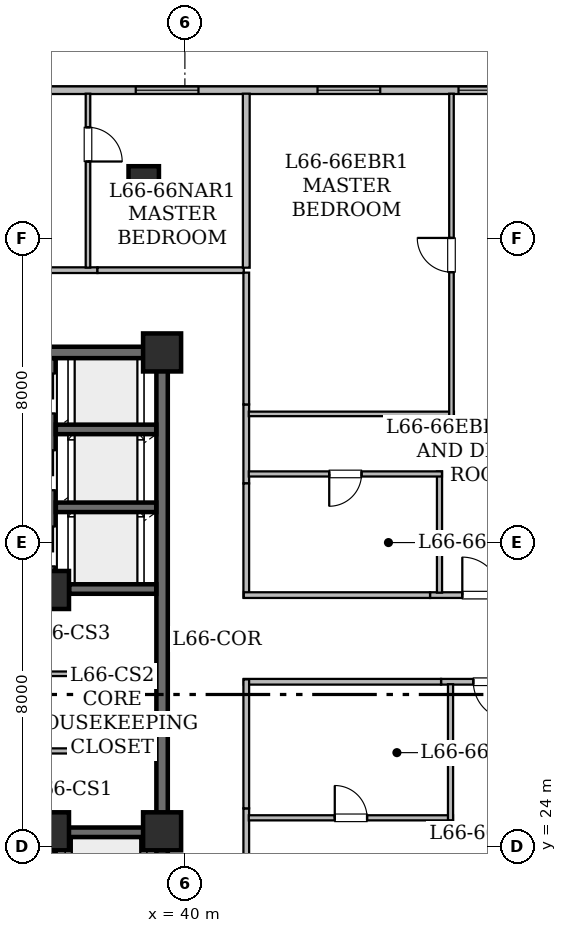
"""IFC4 building model, lengths in metres.
Left out: names, types, materials, properties, quantities, classifications, styles, units other than length and angle.
Written with IfcOpenShell. Run it as: python <this file> out.ifc"""

import sys

from ifc_helpers import new_model, si_unit, direction, frame, frame_2d, origin, origin_2d, place, context, subcontext, project, spatial, rectangle, hollow_rectangle, extrude, element, fill, save


model = new_model("IFC4")
c1 = context("Model", 3, precision=1e-05, world=origin(), true_north=direction((0.0, 1.0)))
c2 = subcontext(c1, "Body", "Model", "MODEL_VIEW")
j1 = project(units=[si_unit("LENGTHUNIT", "METRE"), si_unit("PLANEANGLEUNIT", "RADIAN")], contexts=[c1])
p1 = place(None, origin())
s1 = spatial("IfcSite", under=j1, at=p1, CompositionType="ELEMENT")
p2 = place(p1, origin())
s2 = spatial("IfcBuilding", under=s1, at=p2, CompositionType="ELEMENT")
p3 = place(p2, frame((0.0, 0.0, 257.35)))
s3 = spatial("IfcBuildingStorey", under=s2, at=p3, CompositionType="ELEMENT", Elevation=257.35)
for number, where, z_axis, x_axis in (
    (1, (36.45, 24.4, 0.0), (0.0, 0.0, 1.0), (1.0, 0.0, 0.0)),
    (2, (39.4, 24.4, 0.0), (0.0, 0.0, 1.0), (1.0, 0.0, 0.0)),
    (3, (36.45, 30.75, 0.0), (0.0, 0.0, 1.0), (1.0, 0.0, 0.0)),
    (4, (39.4, 37.0, 0.0), (0.0, 0.0, 1.0), (1.0, 0.0, 0.0)),
):
    element("IfcColumn", number, at=place(p3, frame(where, z_axis=z_axis, x_axis=x_axis)), inside=s3, PredefinedType="COLUMN", context=c2, shape_type="SweptSolid", body=[
        extrude(hollow_rectangle(XDim=1.0, YDim=1.0, WallThickness=0.05, at=origin_2d()), origin(), (0.0, 0.0, 1.0), 3.65),
    ])
p4 = place(p3, frame((38.917, 41.5, 0.0), z_axis=(0.0, 0.0, 1.0), x_axis=(1.0, 0.0, 0.0)))
e5 = element("IfcColumn", 5, at=p4, inside=s3, PredefinedType="COLUMN", context=c2, shape_type="SweptSolid", body=[
    extrude(hollow_rectangle(XDim=0.8, YDim=0.8, WallThickness=0.04, at=origin_2d()), origin(), (0.0, 0.0, 1.0), 3.65),
])
p5 = place(p3, frame((24.302, 43.9, 0.0), z_axis=(0.0, 0.0, 1.0), x_axis=(1.0, 0.0, 0.0)))
e6 = element("IfcWall", 6, at=p5, inside=s3, PredefinedType="STANDARD", context=c2, shape_type="SweptSolid", body=[
    extrude(rectangle(XDim=41.457, YDim=0.2, at=frame_2d((20.729, 0.0))), origin(), (0.0, 0.0, 1.0), 3.43),
])
p6 = place(p5, frame((0.604, 0.0, 0.85)))
e7 = element("IfcOpeningElement", 7, at=p6, cuts=e6, PredefinedType="OPENING", context=c2, shape_type="SweptSolid", body=[
    extrude(rectangle(XDim=1.65, YDim=1.55, at=frame_2d((0.825, 0.775))), frame((0.0, 0.11, 0.0), z_axis=(0.0, -1.0, 0.0), x_axis=(1.0, 0.0, 0.0)), (0.0, 0.0, 1.0), 0.22),
])
p7 = place(p5, frame((9.098, 0.0, 0.85)))
e8 = element("IfcOpeningElement", 8, at=p7, cuts=e6, PredefinedType="OPENING", context=c2, shape_type="SweptSolid", body=[
    extrude(rectangle(XDim=1.65, YDim=1.55, at=frame_2d((0.825, 0.775))), frame((0.0, 0.11, 0.0), z_axis=(0.0, -1.0, 0.0), x_axis=(1.0, 0.0, 0.0)), (0.0, 0.0, 1.0), 0.22),
])
p8 = place(p5, frame((14.405, 0.0, 0.85)))
e9 = element("IfcOpeningElement", 9, at=p8, cuts=e6, PredefinedType="OPENING", context=c2, shape_type="SweptSolid", body=[
    extrude(rectangle(XDim=1.65, YDim=1.55, at=frame_2d((0.825, 0.775))), frame((0.0, 0.11, 0.0), z_axis=(0.0, -1.0, 0.0), x_axis=(1.0, 0.0, 0.0)), (0.0, 0.0, 1.0), 0.22),
])
p9 = place(p5, frame((22.898, 0.0, 0.8)))
e10 = element("IfcOpeningElement", 10, at=p9, cuts=e6, PredefinedType="OPENING", context=c2, shape_type="SweptSolid", body=[
    extrude(rectangle(XDim=1.2, YDim=1.5, at=frame_2d((0.6, 0.75))), frame((0.0, 0.11, 0.0), z_axis=(0.0, -1.0, 0.0), x_axis=(1.0, 0.0, 0.0)), (0.0, 0.0, 1.0), 0.22),
])
p10 = place(p5, frame((19.188, 0.0, 0.85)))
e11 = element("IfcOpeningElement", 11, at=p10, cuts=e6, PredefinedType="OPENING", context=c2, shape_type="SweptSolid", body=[
    extrude(rectangle(XDim=1.65, YDim=1.55, at=frame_2d((0.825, 0.775))), frame((0.0, 0.11, 0.0), z_axis=(0.0, -1.0, 0.0), x_axis=(1.0, 0.0, 0.0)), (0.0, 0.0, 1.0), 0.22),
])
p11 = place(p5, frame((26.158, 0.0, 0.85)))
e12 = element("IfcOpeningElement", 12, at=p11, cuts=e6, PredefinedType="OPENING", context=c2, shape_type="SweptSolid", body=[
    extrude(rectangle(XDim=1.65, YDim=1.55, at=frame_2d((0.825, 0.775))), frame((0.0, 0.11, 0.0), z_axis=(0.0, -1.0, 0.0), x_axis=(1.0, 0.0, 0.0)), (0.0, 0.0, 1.0), 0.22),
])
p12 = place(p5, frame((32.408, 0.0, 0.85)))
e13 = element("IfcOpeningElement", 13, at=p12, cuts=e6, PredefinedType="OPENING", context=c2, shape_type="SweptSolid", body=[
    extrude(rectangle(XDim=1.65, YDim=1.55, at=frame_2d((0.825, 0.775))), frame((0.0, 0.11, 0.0), z_axis=(0.0, -1.0, 0.0), x_axis=(1.0, 0.0, 0.0)), (0.0, 0.0, 1.0), 0.22),
])
p13 = place(p3, frame((29.0, 37.0, 0.0), z_axis=(0.0, 0.0, 1.0), x_axis=(1.0, 0.0, 0.0)))
e14 = element("IfcWall", 14, at=p13, inside=s3, PredefinedType="SHEAR", context=c2, shape_type="SweptSolid", body=[
    extrude(rectangle(XDim=10.4, YDim=0.3, at=frame_2d((5.2, 0.0))), origin(), (0.0, 0.0, 1.0), 3.43),
])
p14 = place(p13, frame((5.14, 0.0, 0.0)))
e15 = element("IfcOpeningElement", 15, at=p14, cuts=e14, PredefinedType="OPENING", context=c2, shape_type="SweptSolid", body=[
    extrude(rectangle(XDim=1.15, YDim=2.2, at=frame_2d((0.575, 1.1))), frame((0.0, 0.16, 0.0), z_axis=(0.0, -1.0, 0.0), x_axis=(1.0, 0.0, 0.0)), (0.0, 0.0, 1.0), 0.32),
])
p15 = place(p3, frame((39.4, 19.0, 0.0), z_axis=(0.0, 0.0, 1.0), x_axis=(0.0, 1.0, 0.0)))
e16 = element("IfcWall", 16, at=p15, inside=s3, PredefinedType="SHEAR", context=c2, shape_type="SweptSolid", body=[
    extrude(rectangle(XDim=5.4, YDim=0.3, at=frame_2d((2.7, 0.0))), origin(), (0.0, 0.0, 1.0), 3.43),
])
p16 = place(p3, frame((39.4, 24.4, 0.0), z_axis=(0.0, 0.0, 1.0), x_axis=(0.0, 1.0, 0.0)))
e17 = element("IfcWall", 17, at=p16, inside=s3, PredefinedType="SHEAR", context=c2, shape_type="SweptSolid", body=[
    extrude(rectangle(XDim=12.6, YDim=0.3, at=frame_2d((6.3, 0.0))), origin(), (0.0, 0.0, 1.0), 3.43),
])
p17 = place(p3, frame((36.45, 19.154, 0.0), z_axis=(0.0, 0.0, 1.0), x_axis=(0.0, 1.0, 0.0)))
e18 = element("IfcWall", 18, at=p17, inside=s3, PredefinedType="SHEAR", context=c2, shape_type="SweptSolid", body=[
    extrude(rectangle(XDim=4.746, YDim=0.3, at=frame_2d((2.373, 0.0))), origin(), (0.0, 0.0, 1.0), 3.43),
])
p18 = place(p17, frame((0.696, 0.0, 0.0)))
e19 = element("IfcOpeningElement", 19, at=p18, cuts=e18, PredefinedType="OPENING", context=c2, shape_type="SweptSolid", body=[
    extrude(rectangle(XDim=1.1, YDim=2.15, at=frame_2d((0.55, 1.075))), frame((0.0, 0.16, 0.0), z_axis=(0.0, -1.0, 0.0), x_axis=(1.0, 0.0, 0.0)), (0.0, 0.0, 1.0), 0.32),
])
p19 = place(p17, frame((3.316, 0.0, 0.0)))
e20 = element("IfcOpeningElement", 20, at=p19, cuts=e18, PredefinedType="OPENING", context=c2, shape_type="SweptSolid", body=[
    extrude(rectangle(XDim=1.1, YDim=2.15, at=frame_2d((0.55, 1.075))), frame((0.0, 0.16, 0.0), z_axis=(0.0, -1.0, 0.0), x_axis=(1.0, 0.0, 0.0)), (0.0, 0.0, 1.0), 0.32),
])
p20 = place(p3, frame((36.45, 31.25, 0.0), z_axis=(0.0, 0.0, 1.0), x_axis=(0.0, 1.0, 0.0)))
e21 = element("IfcWall", 21, at=p20, inside=s3, PredefinedType="SHEAR", context=c2, shape_type="SweptSolid", body=[
    extrude(rectangle(XDim=5.596, YDim=0.3, at=frame_2d((2.798, 0.0))), origin(), (0.0, 0.0, 1.0), 3.43),
])
p21 = place(p20, frame((0.12, 0.0, 0.0)))
e22 = element("IfcOpeningElement", 22, at=p21, cuts=e21, PredefinedType="OPENING", context=c2, shape_type="SweptSolid", body=[
    extrude(rectangle(XDim=1.05, YDim=2.15, at=frame_2d((0.525, 1.075))), frame((0.0, 0.16, 0.0), z_axis=(0.0, -1.0, 0.0), x_axis=(1.0, 0.0, 0.0)), (0.0, 0.0, 1.0), 0.32),
])
p22 = place(p20, frame((2.125, 0.0, 0.0)))
e23 = element("IfcOpeningElement", 23, at=p22, cuts=e21, PredefinedType="OPENING", context=c2, shape_type="SweptSolid", body=[
    extrude(rectangle(XDim=1.05, YDim=2.15, at=frame_2d((0.525, 1.075))), frame((0.0, 0.16, 0.0), z_axis=(0.0, -1.0, 0.0), x_axis=(1.0, 0.0, 0.0)), (0.0, 0.0, 1.0), 0.32),
])
p23 = place(p20, frame((4.145, 0.0, 0.0)))
e24 = element("IfcOpeningElement", 24, at=p23, cuts=e21, PredefinedType="OPENING", context=c2, shape_type="SweptSolid", body=[
    extrude(rectangle(XDim=1.05, YDim=2.15, at=frame_2d((0.525, 1.075))), frame((0.0, 0.16, 0.0), z_axis=(0.0, -1.0, 0.0), x_axis=(1.0, 0.0, 0.0)), (0.0, 0.0, 1.0), 0.32),
])
p24 = place(p3, frame((36.604, 24.375, 0.0), z_axis=(0.0, 0.0, 1.0), x_axis=(1.0, 0.0, 0.0)))
e25 = element("IfcWall", 25, at=p24, inside=s3, PredefinedType="SHEAR", context=c2, shape_type="SweptSolid", body=[
    extrude(rectangle(XDim=2.642, YDim=0.25, at=frame_2d((1.321, 0.0))), origin(), (0.0, 0.0, 1.0), 3.43),
])
p25 = place(p3, frame((36.954, 30.775, 0.0), z_axis=(0.0, 0.0, 1.0), x_axis=(1.0, 0.0, 0.0)))
e26 = element("IfcWall", 26, at=p25, inside=s3, PredefinedType="SHEAR", context=c2, shape_type="SweptSolid", body=[
    extrude(rectangle(XDim=2.292, YDim=0.25, at=frame_2d((1.146, 0.0))), origin(), (0.0, 0.0, 1.0), 3.43),
])
for number, where, z_axis, x_axis in (
    (27, (36.604, 32.925, 0.0), (0.0, 0.0, 1.0), (1.0, 0.0, 0.0)),
    (28, (36.604, 34.975, 0.0), (0.0, 0.0, 1.0), (1.0, 0.0, 0.0)),
):
    element("IfcWall", number, at=place(p3, frame(where, z_axis=z_axis, x_axis=x_axis)), inside=s3, PredefinedType="SHEAR", context=c2, shape_type="SweptSolid", body=[
        extrude(rectangle(XDim=2.642, YDim=0.25, at=frame_2d((1.321, 0.0))), origin(), (0.0, 0.0, 1.0), 3.43),
    ])
p26 = place(p3, frame((34.612, 26.515, 0.0), z_axis=(0.0, 0.0, 1.0), x_axis=(1.0, 0.0, 0.0)))
e29 = element("IfcWall", 29, at=p26, inside=s3, PredefinedType="PARTITIONING", context=c2, shape_type="SweptSolid", body=[
    extrude(rectangle(XDim=4.644, YDim=0.135, at=frame_2d((2.322, 0.0))), origin(), (0.0, 0.0, 1.0), 3.43),
])
p27 = place(p3, frame((34.612, 28.545, 0.0), z_axis=(0.0, 0.0, 1.0), x_axis=(1.0, 0.0, 0.0)))
e30 = element("IfcWall", 30, at=p27, inside=s3, PredefinedType="PARTITIONING", context=c2, shape_type="SweptSolid", body=[
    extrude(rectangle(XDim=4.644, YDim=0.12, at=frame_2d((2.322, 0.0))), origin(), (0.0, 0.0, 1.0), 3.43),
])
p28 = place(p3, frame((30.751, 39.165, 0.0), z_axis=(0.0, 0.0, 1.0), x_axis=(1.0, 0.0, 0.0)))
e31 = element("IfcWall", 31, at=p28, inside=s3, PredefinedType="STANDARD", context=c2, shape_type="SweptSolid", body=[
    extrude(rectangle(XDim=6.948, YDim=0.15, at=frame_2d((3.474, 0.0))), origin(), (0.0, 0.0, 1.0), 3.43),
])
p29 = place(p28, frame((2.974, 0.0, 0.0)))
e32 = element("IfcOpeningElement", 32, at=p29, cuts=e31, PredefinedType="OPENING", context=c2, shape_type="SweptSolid", body=[
    extrude(rectangle(XDim=1.0, YDim=2.15, at=frame_2d((0.5, 1.075))), frame((0.0, 0.085, 0.0), z_axis=(0.0, -1.0, 0.0), x_axis=(1.0, 0.0, 0.0)), (0.0, 0.0, 1.0), 0.17),
])
p30 = place(p3, frame((37.699, 39.165, 0.0), z_axis=(0.0, 0.0, 1.0), x_axis=(1.0, 0.0, 0.0)))
e33 = element("IfcWall", 33, at=p30, inside=s3, PredefinedType="STANDARD", context=c2, shape_type="SweptSolid", body=[
    extrude(rectangle(XDim=3.851, YDim=0.15, at=frame_2d((1.926, 0.0))), origin(), (0.0, 0.0, 1.0), 2.725),
])
p31 = place(p3, frame((49.439, 28.335, 0.0), z_axis=(0.0, 0.0, 1.0), x_axis=(-1.0, 0.0, 0.0)))
e34 = element("IfcWall", 34, at=p31, inside=s3, PredefinedType="STANDARD", context=c2, shape_type="SweptSolid", body=[
    extrude(rectangle(XDim=2.698, YDim=0.15, at=frame_2d((1.349, 0.0))), origin(), (0.0, 0.0, 1.0), 3.43),
])
p32 = place(p31, frame((0.849, 0.0, 0.0)))
e35 = element("IfcOpeningElement", 35, at=p32, cuts=e34, PredefinedType="OPENING", context=c2, shape_type="SweptSolid", body=[
    extrude(rectangle(XDim=1.0, YDim=2.15, at=frame_2d((0.5, 1.075))), frame((0.0, 0.085, 0.0), z_axis=(0.0, -1.0, 0.0), x_axis=(1.0, 0.0, 0.0)), (0.0, 0.0, 1.0), 0.17),
])
p33 = place(p3, frame((41.615, 25.004, 0.0), z_axis=(0.0, 0.0, 1.0), x_axis=(0.0, -1.0, 0.0)))
e36 = element("IfcWall", 36, at=p33, inside=s3, PredefinedType="STANDARD", context=c2, shape_type="SweptSolid", body=[
    extrude(rectangle(XDim=2.078, YDim=0.15, at=frame_2d((1.039, 0.0))), origin(), (0.0, 0.0, 1.0), 3.43),
])
p34 = place(p3, frame((46.741, 28.335, 0.0), z_axis=(0.0, 0.0, 1.0), x_axis=(-1.0, 0.0, 0.0)))
e37 = element("IfcWall", 37, at=p34, inside=s3, PredefinedType="STANDARD", context=c2, shape_type="SweptSolid", body=[
    extrude(rectangle(XDim=5.191, YDim=0.15, at=frame_2d((2.595, 0.0))), origin(), (0.0, 0.0, 1.0), 3.43),
])
p35 = place(p3, frame((41.615, 28.398, 0.0), z_axis=(0.0, 0.0, 1.0), x_axis=(0.0, -1.0, 0.0)))
e38 = element("IfcWall", 38, at=p35, inside=s3, PredefinedType="STANDARD", context=c2, shape_type="SweptSolid", body=[
    extrude(rectangle(XDim=3.394, YDim=0.15, at=frame_2d((1.697, 0.0))), origin(), (0.0, 0.0, 1.0), 3.43),
])
p36 = place(p3, frame((41.615, 35.632, 0.0), z_axis=(0.0, 0.0, 1.0), x_axis=(0.0, -1.0, 0.0)))
e39 = element("IfcWall", 39, at=p36, inside=s3, PredefinedType="STANDARD", context=c2, shape_type="SweptSolid", body=[
    extrude(rectangle(XDim=2.078, YDim=0.15, at=frame_2d((1.039, 0.0))), origin(), (0.0, 0.0, 1.0), 3.43),
])
p37 = place(p3, frame((46.451, 30.615, 0.0), z_axis=(0.0, 0.0, 1.0), x_axis=(1.0, 0.0, 0.0)))
e40 = element("IfcWall", 40, at=p37, inside=s3, PredefinedType="STANDARD", context=c2, shape_type="SweptSolid", body=[
    extrude(rectangle(XDim=2.698, YDim=0.15, at=frame_2d((1.349, 0.0))), origin(), (0.0, 0.0, 1.0), 3.43),
])
p38 = place(p37, frame((0.849, 0.0, 0.0)))
e41 = element("IfcOpeningElement", 41, at=p38, cuts=e40, PredefinedType="OPENING", context=c2, shape_type="SweptSolid", body=[
    extrude(rectangle(XDim=1.0, YDim=2.15, at=frame_2d((0.5, 1.075))), frame((0.0, 0.085, 0.0), z_axis=(0.0, -1.0, 0.0), x_axis=(1.0, 0.0, 0.0)), (0.0, 0.0, 1.0), 0.17),
])
p39 = place(p3, frame((41.615, 33.554, 0.0), z_axis=(0.0, 0.0, 1.0), x_axis=(0.0, -1.0, 0.0)))
e42 = element("IfcWall", 42, at=p39, inside=s3, PredefinedType="STANDARD", context=c2, shape_type="SweptSolid", body=[
    extrude(rectangle(XDim=3.004, YDim=0.15, at=frame_2d((1.502, 0.0))), origin(), (0.0, 0.0, 1.0), 3.065),
])
p40 = place(p3, frame((41.55, 30.615, 0.0), z_axis=(0.0, 0.0, 1.0), x_axis=(1.0, 0.0, 0.0)))
e43 = element("IfcWall", 43, at=p40, inside=s3, PredefinedType="STANDARD", context=c2, shape_type="SweptSolid", body=[
    extrude(rectangle(XDim=4.901, YDim=0.15, at=frame_2d((2.45, 0.0))), origin(), (0.0, 0.0, 1.0), 3.43),
])
p41 = place(p3, frame((41.615, 39.1, 0.0), z_axis=(0.0, 0.0, 1.0), x_axis=(0.0, -1.0, 0.0)))
e44 = element("IfcWall", 44, at=p41, inside=s3, PredefinedType="STANDARD", context=c2, shape_type="SweptSolid", body=[
    extrude(rectangle(XDim=3.468, YDim=0.15, at=frame_2d((1.734, 0.0))), origin(), (0.0, 0.0, 1.0), 2.725),
])
p42 = place(p3, frame((37.45, 43.808, 0.0), z_axis=(0.0, 0.0, 1.0), x_axis=(0.0, -1.0, 0.0)))
e45 = element("IfcWall", 45, at=p42, inside=s3, PredefinedType="PARTITIONING", context=c2, shape_type="SweptSolid", body=[
    extrude(rectangle(XDim=4.576, YDim=0.12, at=frame_2d((2.288, 0.0))), origin(), (0.0, 0.0, 1.0), 2.887),
])
p43 = place(p42, frame((0.884, 0.0, 0.0)))
e46 = element("IfcOpeningElement", 46, at=p43, cuts=e45, PredefinedType="OPENING", context=c2, shape_type="SweptSolid", body=[
    extrude(rectangle(XDim=0.9, YDim=2.1, at=frame_2d((0.45, 1.05))), frame((0.0, 0.07, 0.0), z_axis=(0.0, -1.0, 0.0), x_axis=(1.0, 0.0, 0.0)), (0.0, 0.0, 1.0), 0.14),
])
p44 = place(p3, frame((41.615, 43.808, 0.0), z_axis=(0.0, 0.0, 1.0), x_axis=(0.0, -1.0, 0.0)))
e47 = element("IfcWall", 47, at=p44, inside=s3, PredefinedType="STANDARD", context=c2, shape_type="SweptSolid", body=[
    extrude(rectangle(XDim=4.578, YDim=0.18, at=frame_2d((2.289, 0.0))), origin(), (0.0, 0.0, 1.0), 2.887),
])
p45 = place(p3, frame((41.682, 24.755, 0.0), z_axis=(0.0, 0.0, 1.0), x_axis=(1.0, 0.0, 0.0)))
e48 = element("IfcWall", 48, at=p45, inside=s3, PredefinedType="PARTITIONING", context=c2, shape_type="SweptSolid", body=[
    extrude(rectangle(XDim=5.373, YDim=0.135, at=frame_2d((2.687, 0.0))), origin(), (0.0, 0.0, 1.0), 3.43),
])
p46 = place(p45, frame((2.262, 0.0, 0.0)))
e49 = element("IfcOpeningElement", 49, at=p46, cuts=e48, PredefinedType="OPENING", context=c2, shape_type="SweptSolid", body=[
    extrude(rectangle(XDim=0.85, YDim=2.1, at=frame_2d((0.425, 1.05))), frame((0.0, 0.077, 0.0), z_axis=(0.0, -1.0, 0.0), x_axis=(1.0, 0.0, 0.0)), (0.0, 0.0, 1.0), 0.155),
])
p47 = place(p3, frame((46.99, 24.69, 0.0), z_axis=(0.0, 0.0, 1.0), x_axis=(0.0, 1.0, 0.0)))
e50 = element("IfcWall", 50, at=p47, inside=s3, PredefinedType="PARTITIONING", context=c2, shape_type="SweptSolid", body=[
    extrude(rectangle(XDim=3.58, YDim=0.135, at=frame_2d((1.79, 0.0))), origin(), (0.0, 0.0, 1.0), 3.43),
])
p48 = place(p3, frame((46.7, 30.68, 0.0), z_axis=(0.0, 0.0, 1.0), x_axis=(0.0, 1.0, 0.0)))
e51 = element("IfcWall", 51, at=p48, inside=s3, PredefinedType="PARTITIONING", context=c2, shape_type="SweptSolid", body=[
    extrude(rectangle(XDim=3.188, YDim=0.135, at=frame_2d((1.594, 0.0))), origin(), (0.0, 0.0, 1.0), 3.065),
])
p49 = place(p3, frame((46.765, 33.803, 0.0), z_axis=(0.0, 0.0, 1.0), x_axis=(-1.0, 0.0, 0.0)))
e52 = element("IfcWall", 52, at=p49, inside=s3, PredefinedType="PARTITIONING", context=c2, shape_type="SweptSolid", body=[
    extrude(rectangle(XDim=5.083, YDim=0.135, at=frame_2d((2.542, 0.0))), origin(), (0.0, 0.0, 1.0), 3.43),
])
p50 = place(p49, frame((2.117, 0.0, 0.0)))
e53 = element("IfcOpeningElement", 53, at=p50, cuts=e52, PredefinedType="OPENING", context=c2, shape_type="SweptSolid", body=[
    extrude(rectangle(XDim=0.85, YDim=2.1, at=frame_2d((0.425, 1.05))), frame((0.0, 0.077, 0.0), z_axis=(0.0, -1.0, 0.0), x_axis=(1.0, 0.0, 0.0)), (0.0, 0.0, 1.0), 0.155),
])
p51 = place(p3, frame((41.682, 35.383, 0.0), z_axis=(0.0, 0.0, 1.0), x_axis=(1.0, 0.0, 0.0)))
e54 = element("IfcWall", 54, at=p51, inside=s3, PredefinedType="PARTITIONING", context=c2, shape_type="SweptSolid", body=[
    extrude(rectangle(XDim=5.398, YDim=0.12, at=frame_2d((2.699, 0.0))), origin(), (0.0, 0.0, 1.0), 3.43),
])
p52 = place(p3, frame((47.015, 35.318, 0.0), z_axis=(0.0, 0.0, 1.0), x_axis=(0.0, 1.0, 0.0)))
e55 = element("IfcWall", 55, at=p52, inside=s3, PredefinedType="PARTITIONING", context=c2, shape_type="SweptSolid", body=[
    extrude(rectangle(XDim=8.49, YDim=0.12, at=frame_2d((4.245, 0.0))), origin(), (0.0, 0.0, 1.0), 2.725),
])
p53 = place(p52, frame((3.795, 0.0, 0.0)))
e56 = element("IfcOpeningElement", 56, at=p53, cuts=e55, PredefinedType="OPENING", context=c2, shape_type="SweptSolid", body=[
    extrude(rectangle(XDim=0.9, YDim=2.1, at=frame_2d((0.45, 1.05))), frame((0.0, 0.07, 0.0), z_axis=(0.0, -1.0, 0.0), x_axis=(1.0, 0.0, 0.0)), (0.0, 0.0, 1.0), 0.14),
])
p54 = place(p8, origin())
e57 = element("IfcWindow", 57, at=p54, inside=s3, PartitioningType="SINGLE_PANEL", PredefinedType="WINDOW", context=c2, shape_type="SweptSolid", body=[
    extrude(rectangle(XDim=1.65, YDim=1.55, at=frame_2d((0.825, 0.775))), frame((0.0, 0.03, 0.0), z_axis=(0.0, -1.0, 0.0), x_axis=(1.0, 0.0, 0.0)), (0.0, 0.0, 1.0), 0.06),
])
fill(e9, e57)
p55 = place(p9, origin())
e58 = element("IfcWindow", 58, at=p55, inside=s3, PartitioningType="SINGLE_PANEL", PredefinedType="WINDOW", context=c2, shape_type="SweptSolid", body=[
    extrude(rectangle(XDim=1.2, YDim=1.5, at=frame_2d((0.6, 0.75))), frame((0.0, 0.03, 0.0), z_axis=(0.0, -1.0, 0.0), x_axis=(1.0, 0.0, 0.0)), (0.0, 0.0, 1.0), 0.06),
])
fill(e10, e58)
p56 = place(p10, origin())
e59 = element("IfcWindow", 59, at=p56, inside=s3, PartitioningType="SINGLE_PANEL", PredefinedType="WINDOW", context=c2, shape_type="SweptSolid", body=[
    extrude(rectangle(XDim=1.65, YDim=1.55, at=frame_2d((0.825, 0.775))), frame((0.0, 0.03, 0.0), z_axis=(0.0, -1.0, 0.0), x_axis=(1.0, 0.0, 0.0)), (0.0, 0.0, 1.0), 0.06),
])
fill(e11, e59)
p57 = place(p32, origin())
e60 = element("IfcDoor", 60, at=p57, inside=s3, OperationType="SINGLE_SWING_LEFT", PredefinedType="DOOR", context=c2, shape_type="SweptSolid", body=[
    extrude(rectangle(XDim=1.0, YDim=2.15, at=frame_2d((0.5, 1.075))), frame((0.0, 0.025, 0.0), z_axis=(0.0, -1.0, 0.0), x_axis=(1.0, 0.0, 0.0)), (0.0, 0.0, 1.0), 0.05),
])
fill(e35, e60)
p58 = place(p38, origin())
e61 = element("IfcDoor", 61, at=p58, inside=s3, OperationType="SINGLE_SWING_LEFT", PredefinedType="DOOR", context=c2, shape_type="SweptSolid", body=[
    extrude(rectangle(XDim=1.0, YDim=2.15, at=frame_2d((0.5, 1.075))), frame((0.0, 0.025, 0.0), z_axis=(0.0, -1.0, 0.0), x_axis=(1.0, 0.0, 0.0)), (0.0, 0.0, 1.0), 0.05),
])
fill(e41, e61)
p59 = place(p43, origin())
e62 = element("IfcDoor", 62, at=p59, inside=s3, OperationType="SINGLE_SWING_RIGHT", PredefinedType="DOOR", context=c2, shape_type="SweptSolid", body=[
    extrude(rectangle(XDim=0.9, YDim=2.1, at=frame_2d((0.45, 1.05))), frame((0.0, 0.025, 0.0), z_axis=(0.0, -1.0, 0.0), x_axis=(1.0, 0.0, 0.0)), (0.0, 0.0, 1.0), 0.05),
])
fill(e46, e62)
p60 = place(p46, origin())
e63 = element("IfcDoor", 63, at=p60, inside=s3, OperationType="SINGLE_SWING_LEFT", PredefinedType="DOOR", context=c2, shape_type="SweptSolid", body=[
    extrude(rectangle(XDim=0.85, YDim=2.1, at=frame_2d((0.425, 1.05))), frame((0.0, 0.025, 0.0), z_axis=(0.0, -1.0, 0.0), x_axis=(1.0, 0.0, 0.0)), (0.0, 0.0, 1.0), 0.05),
])
fill(e49, e63)
p61 = place(p50, origin())
e64 = element("IfcDoor", 64, at=p61, inside=s3, OperationType="SINGLE_SWING_RIGHT", PredefinedType="DOOR", context=c2, shape_type="SweptSolid", body=[
    extrude(rectangle(XDim=0.85, YDim=2.1, at=frame_2d((0.425, 1.05))), frame((0.0, 0.025, 0.0), z_axis=(0.0, -1.0, 0.0), x_axis=(1.0, 0.0, 0.0)), (0.0, 0.0, 1.0), 0.05),
])
fill(e53, e64)
p62 = place(p53, origin())
e65 = element("IfcDoor", 65, at=p62, inside=s3, OperationType="SINGLE_SWING_RIGHT", PredefinedType="DOOR", context=c2, shape_type="SweptSolid", body=[
    extrude(rectangle(XDim=0.9, YDim=2.1, at=frame_2d((0.45, 1.05))), frame((0.0, 0.025, 0.0), z_axis=(0.0, -1.0, 0.0), x_axis=(1.0, 0.0, 0.0)), (0.0, 0.0, 1.0), 0.05),
])
fill(e56, e65)
save(model, sys.argv[1])
